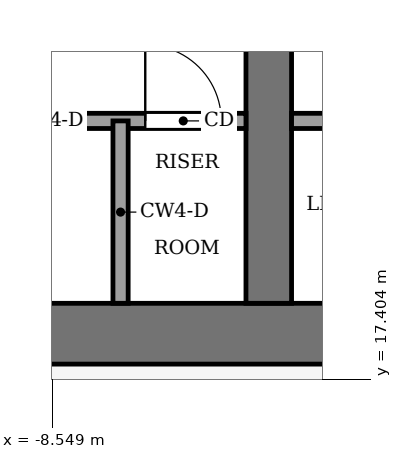
"""IFC4 building model, lengths in metres.
Left out: names, types, materials, properties, quantities, classifications, styles, units other than length and angle.
Written with IfcOpenShell. Run it as: python <this file> out.ifc"""

import sys

from ifc_helpers import new_model, si_unit, direction, frame, frame_2d, origin, place, context, subcontext, project, spatial, rectangle, extrude, element, fill, save


model = new_model("IFC4")
c1 = context("Model", 3, precision=1e-05, world=origin(), true_north=direction((0.0, 1.0)))
c2 = subcontext(c1, "Body", "Model", "MODEL_VIEW")
j1 = project(units=[si_unit("LENGTHUNIT", "METRE"), si_unit("PLANEANGLEUNIT", "RADIAN")], contexts=[c1])
p1 = place(None, origin())
s1 = spatial("IfcSite", under=j1, at=p1, CompositionType="ELEMENT")
p2 = place(p1, origin())
s2 = spatial("IfcBuilding", under=s1, at=p2, CompositionType="ELEMENT")
p3 = place(p2, frame((0.0, 0.0, 278.0)))
s3 = spatial("IfcBuildingStorey", under=s2, at=p3, CompositionType="ELEMENT", Elevation=278.0)
p4 = place(p3, frame((-13.4, 18.0, -0.13), z_axis=(0.0, 0.0, 1.0), x_axis=(1.0, 0.0, 0.0)))
e1 = element("IfcWall", 1, at=p4, inside=s3, PredefinedType="SHEAR", context=c2, shape_type="SweptSolid", body=[
    extrude(rectangle(XDim=26.8, YDim=0.8, at=frame_2d((13.4, 0.0))), origin(), (0.0, 0.0, 1.0), 3.88),
])
p5 = place(p3, frame((-5.7, 18.4, -0.13), z_axis=(0.0, 0.0, 1.0), x_axis=(0.0, 1.0, 0.0)))
e2 = element("IfcWall", 2, at=p5, inside=s3, PredefinedType="SHEAR", context=c2, shape_type="SweptSolid", body=[
    extrude(rectangle(XDim=19.2, YDim=0.6, at=frame_2d((9.6, 0.0))), origin(), (0.0, 0.0, 1.0), 3.88),
])
p6 = place(p5, frame((8.35, 0.0, 0.13)))
e3 = element("IfcOpeningElement", 3, at=p6, cuts=e2, PredefinedType="OPENING", context=c2, shape_type="SweptSolid", body=[
    extrude(rectangle(XDim=0.9, YDim=2.1, at=frame_2d((0.45, 1.05))), frame((0.0, 0.31, 0.0), z_axis=(0.0, -1.0, 0.0), x_axis=(1.0, 0.0, 0.0)), (0.0, 0.0, 1.0), 0.62),
])
p7 = place(p3, frame((-12.6, 20.8, 0.0), z_axis=(0.0, 0.0, 1.0), x_axis=(1.0, 0.0, 0.0)))
e4 = element("IfcWall", 4, at=p7, inside=s3, PredefinedType="PARTITIONING", context=c2, shape_type="SweptSolid", body=[
    extrude(rectangle(XDim=6.6, YDim=0.2, at=frame_2d((3.3, 0.0))), origin(), (0.0, 0.0, 1.0), 3.75),
])
p8 = place(p7, frame((0.325, 0.0, 0.0)))
e5 = element("IfcOpeningElement", 5, at=p8, cuts=e4, PredefinedType="OPENING", context=c2, shape_type="SweptSolid", body=[
    extrude(rectangle(XDim=1.0, YDim=2.1, at=frame_2d((0.5, 1.05))), frame((0.0, 0.11, 0.0), z_axis=(0.0, -1.0, 0.0), x_axis=(1.0, 0.0, 0.0)), (0.0, 0.0, 1.0), 0.22),
])
p9 = place(p7, frame((2.8, 0.0, 0.0)))
e6 = element("IfcOpeningElement", 6, at=p9, cuts=e4, PredefinedType="OPENING", context=c2, shape_type="SweptSolid", body=[
    extrude(rectangle(XDim=1.0, YDim=2.1, at=frame_2d((0.5, 1.05))), frame((0.0, 0.11, 0.0), z_axis=(0.0, -1.0, 0.0), x_axis=(1.0, 0.0, 0.0)), (0.0, 0.0, 1.0), 0.22),
])
p10 = place(p7, frame((5.275, 0.0, 0.0)))
e7 = element("IfcOpeningElement", 7, at=p10, cuts=e4, PredefinedType="OPENING", context=c2, shape_type="SweptSolid", body=[
    extrude(rectangle(XDim=1.0, YDim=2.1, at=frame_2d((0.5, 1.05))), frame((0.0, 0.11, 0.0), z_axis=(0.0, -1.0, 0.0), x_axis=(1.0, 0.0, 0.0)), (0.0, 0.0, 1.0), 0.22),
])
p11 = place(p3, frame((-5.4, 20.8, 0.0), z_axis=(0.0, 0.0, 1.0), x_axis=(1.0, 0.0, 0.0)))
e8 = element("IfcWall", 8, at=p11, inside=s3, PredefinedType="PARTITIONING", context=c2, shape_type="SweptSolid", body=[
    extrude(rectangle(XDim=10.8, YDim=0.2, at=frame_2d((5.4, 0.0))), origin(), (0.0, 0.0, 1.0), 3.75),
])
p12 = place(p11, frame((0.75, 0.0, 0.0)))
e9 = element("IfcOpeningElement", 9, at=p12, cuts=e8, PredefinedType="OPENING", context=c2, shape_type="SweptSolid", body=[
    extrude(rectangle(XDim=1.2, YDim=2.2, at=frame_2d((0.6, 1.1))), frame((0.0, 0.11, 0.0), z_axis=(0.0, -1.0, 0.0), x_axis=(1.0, 0.0, 0.0)), (0.0, 0.0, 1.0), 0.22),
])
p13 = place(p11, frame((3.45, 0.0, 0.0)))
e10 = element("IfcOpeningElement", 10, at=p13, cuts=e8, PredefinedType="OPENING", context=c2, shape_type="SweptSolid", body=[
    extrude(rectangle(XDim=1.2, YDim=2.2, at=frame_2d((0.6, 1.1))), frame((0.0, 0.11, 0.0), z_axis=(0.0, -1.0, 0.0), x_axis=(1.0, 0.0, 0.0)), (0.0, 0.0, 1.0), 0.22),
])
p14 = place(p11, frame((6.15, 0.0, 0.0)))
e11 = element("IfcOpeningElement", 11, at=p14, cuts=e8, PredefinedType="OPENING", context=c2, shape_type="SweptSolid", body=[
    extrude(rectangle(XDim=1.2, YDim=2.2, at=frame_2d((0.6, 1.1))), frame((0.0, 0.11, 0.0), z_axis=(0.0, -1.0, 0.0), x_axis=(1.0, 0.0, 0.0)), (0.0, 0.0, 1.0), 0.22),
])
p15 = place(p11, frame((8.85, 0.0, 0.0)))
e12 = element("IfcOpeningElement", 12, at=p15, cuts=e8, PredefinedType="OPENING", context=c2, shape_type="SweptSolid", body=[
    extrude(rectangle(XDim=1.2, YDim=2.2, at=frame_2d((0.6, 1.1))), frame((0.0, 0.11, 0.0), z_axis=(0.0, -1.0, 0.0), x_axis=(1.0, 0.0, 0.0)), (0.0, 0.0, 1.0), 0.22),
])
p16 = place(p3, frame((-7.65, 18.4, 0.0), z_axis=(0.0, 0.0, 1.0), x_axis=(0.0, 1.0, 0.0)))
e13 = element("IfcWall", 13, at=p16, inside=s3, PredefinedType="PARTITIONING", context=c2, shape_type="SweptSolid", body=[
    extrude(rectangle(XDim=2.4, YDim=0.2, at=frame_2d((1.2, 0.0))), origin(), (0.0, 0.0, 1.0), 3.75),
])
p17 = place(p10, origin())
e14 = element("IfcDoor", 14, at=p17, inside=s3, OperationType="SINGLE_SWING_RIGHT", PredefinedType="DOOR", context=c2, shape_type="SweptSolid", body=[
    extrude(rectangle(XDim=1.0, YDim=2.1, at=frame_2d((0.5, 1.05))), frame((0.0, 0.025, 0.0), z_axis=(0.0, -1.0, 0.0), x_axis=(1.0, 0.0, 0.0)), (0.0, 0.0, 1.0), 0.05),
])
fill(e7, e14)
save(model, sys.argv[1])
